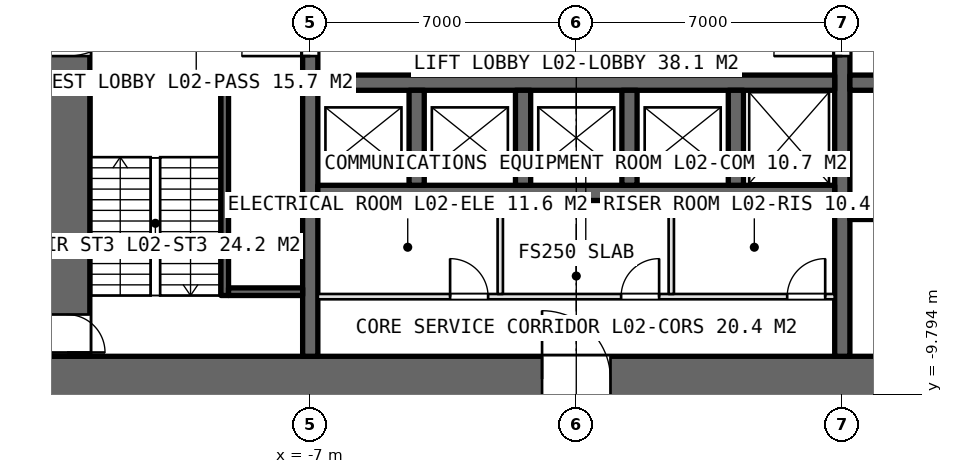
"""IFC4 building model, lengths in metres.
Left out: names, types, materials, properties, quantities, classifications, styles, units other than length and angle.
Written with IfcOpenShell. Run it as: python <this file> out.ifc"""

import sys

from ifc_helpers import new_model, si_unit, direction, frame, frame_2d, origin, place, context, subcontext, project, spatial, rectangle, extrude, element, fill, save


model = new_model("IFC4")
c1 = context("Model", 3, precision=1e-05, world=origin(), true_north=direction((0.0, 1.0)))
c2 = subcontext(c1, "Body", "Model", "MODEL_VIEW")
j1 = project(units=[si_unit("LENGTHUNIT", "METRE"), si_unit("PLANEANGLEUNIT", "RADIAN")], contexts=[c1])
p1 = place(None, origin())
s1 = spatial("IfcSite", under=j1, at=p1, CompositionType="ELEMENT")
p2 = place(p1, origin())
s2 = spatial("IfcBuilding", under=s1, at=p2, CompositionType="ELEMENT")
p3 = place(p2, frame((0.0, 0.0, 10.0)))
s3 = spatial("IfcBuildingStorey", under=s2, at=p3, CompositionType="ELEMENT", Elevation=10.0)
p4 = place(p3, frame((-14.0, -9.4, 0.0), z_axis=(0.0, 0.0, 1.0), x_axis=(1.0, 0.0, 0.0)))
e1 = element("IfcWall", 1, at=p4, inside=s3, PredefinedType="SHEAR", context=c2, shape_type="SweptSolid", body=[
    extrude(rectangle(XDim=28.0, YDim=1.2, at=frame_2d((14.0, 0.0))), origin(), (0.0, 0.0, 1.0), 5.0),
])
p5 = place(p4, frame((13.1, 0.0, 0.0)))
e2 = element("IfcOpeningElement", 2, at=p5, cuts=e1, PredefinedType="OPENING", context=c2, shape_type="SweptSolid", body=[
    extrude(rectangle(XDim=1.8, YDim=2.4, at=frame_2d((0.9, 1.2))), frame((0.0, 0.61, 0.0), z_axis=(0.0, -1.0, 0.0), x_axis=(1.0, 0.0, 0.0)), (0.0, 0.0, 1.0), 1.22),
])
p6 = place(p4, frame((22.9, 0.0, 0.0)))
e3 = element("IfcOpeningElement", 3, at=p6, cuts=e1, PredefinedType="OPENING", context=c2, shape_type="SweptSolid", body=[
    extrude(rectangle(XDim=2.2, YDim=2.7, at=frame_2d((1.1, 1.35))), frame((0.0, 0.61, 0.0), z_axis=(0.0, -1.0, 0.0), x_axis=(1.0, 0.0, 0.0)), (0.0, 0.0, 1.0), 1.22),
])
p7 = place(p3, frame((-13.4, 8.8, 0.0), z_axis=(0.0, 0.0, 1.0), x_axis=(0.0, -1.0, 0.0)))
e4 = element("IfcWall", 4, at=p7, inside=s3, PredefinedType="SHEAR", context=c2, shape_type="SweptSolid", body=[
    extrude(rectangle(XDim=17.6, YDim=1.2, at=frame_2d((8.8, 0.0))), origin(), (0.0, 0.0, 1.0), 5.0),
])
p8 = place(p7, frame((7.9, 0.0, 0.0)))
e5 = element("IfcOpeningElement", 5, at=p8, cuts=e4, PredefinedType="OPENING", context=c2, shape_type="SweptSolid", body=[
    extrude(rectangle(XDim=1.8, YDim=2.4, at=frame_2d((0.9, 1.2))), frame((0.0, 0.61, 0.0), z_axis=(0.0, -1.0, 0.0), x_axis=(1.0, 0.0, 0.0)), (0.0, 0.0, 1.0), 1.22),
])
p9 = place(p7, frame((16.5, 0.0, 0.0)))
e6 = element("IfcOpeningElement", 6, at=p9, cuts=e4, PredefinedType="OPENING", context=c2, shape_type="SweptSolid", body=[
    extrude(rectangle(XDim=1.0, YDim=2.4, at=frame_2d((0.5, 1.2))), frame((0.0, 0.61, 0.0), z_axis=(0.0, -1.0, 0.0), x_axis=(1.0, 0.0, 0.0)), (0.0, 0.0, 1.0), 1.22),
])
p10 = place(p3, frame((-7.0, -8.8, 0.0), z_axis=(0.0, 0.0, 1.0), x_axis=(0.0, 1.0, 0.0)))
e7 = element("IfcWall", 7, at=p10, inside=s3, PredefinedType="SHEAR", context=c2, shape_type="SweptSolid", body=[
    extrude(rectangle(XDim=17.6, YDim=0.4, at=frame_2d((8.8, 0.0))), origin(), (0.0, 0.0, 1.0), 5.0),
])
p11 = place(p10, frame((7.9, 0.0, 0.0)))
e8 = element("IfcOpeningElement", 8, at=p11, cuts=e7, PredefinedType="OPENING", context=c2, shape_type="SweptSolid", body=[
    extrude(rectangle(XDim=1.8, YDim=2.4, at=frame_2d((0.9, 1.2))), frame((0.0, 0.21, 0.0), z_axis=(0.0, -1.0, 0.0), x_axis=(1.0, 0.0, 0.0)), (0.0, 0.0, 1.0), 0.42),
])
p12 = place(p3, frame((7.0, -8.8, 0.0), z_axis=(0.0, 0.0, 1.0), x_axis=(0.0, 1.0, 0.0)))
e9 = element("IfcWall", 9, at=p12, inside=s3, PredefinedType="SHEAR", context=c2, shape_type="SweptSolid", body=[
    extrude(rectangle(XDim=17.6, YDim=0.4, at=frame_2d((8.8, 0.0))), origin(), (0.0, 0.0, 1.0), 5.0),
])
p13 = place(p12, frame((7.9, 0.0, 0.0)))
e10 = element("IfcOpeningElement", 10, at=p13, cuts=e9, PredefinedType="OPENING", context=c2, shape_type="SweptSolid", body=[
    extrude(rectangle(XDim=1.8, YDim=2.4, at=frame_2d((0.9, 1.2))), frame((0.0, 0.21, 0.0), z_axis=(0.0, -1.0, 0.0), x_axis=(1.0, 0.0, 0.0)), (0.0, 0.0, 1.0), 0.42),
])
for number, where, z_axis, x_axis in (
    (11, (-6.8, -1.6, 0.0), (0.0, 0.0, 1.0), (1.0, 0.0, 0.0)),
    (12, (-6.8, -4.5, 0.0), (0.0, 0.0, 1.0), (1.0, 0.0, 0.0)),
):
    element("IfcWall", number, at=place(p3, frame(where, z_axis=z_axis, x_axis=x_axis)), inside=s3, PredefinedType="SHEAR", context=c2, shape_type="SweptSolid", body=[
        extrude(rectangle(XDim=13.6, YDim=0.4, at=frame_2d((6.8, 0.0))), origin(), (0.0, 0.0, 1.0), 5.0),
    ])
p14 = place(p3, frame((-12.8, -1.6, 0.0), z_axis=(0.0, 0.0, 1.0), x_axis=(1.0, 0.0, 0.0)))
e13 = element("IfcWall", 13, at=p14, inside=s3, PredefinedType="SHEAR", context=c2, shape_type="SweptSolid", body=[
    extrude(rectangle(XDim=5.6, YDim=0.4, at=frame_2d((2.8, 0.0))), origin(), (0.0, 0.0, 1.0), 5.0),
])
p15 = place(p3, frame((7.2, -1.6, 0.0), z_axis=(0.0, 0.0, 1.0), x_axis=(1.0, 0.0, 0.0)))
e14 = element("IfcWall", 14, at=p15, inside=s3, PredefinedType="SHEAR", context=c2, shape_type="SweptSolid", body=[
    extrude(rectangle(XDim=5.6, YDim=0.4, at=frame_2d((2.8, 0.0))), origin(), (0.0, 0.0, 1.0), 5.0),
])
p16 = place(p15, frame((0.9, 0.0, 0.0)))
e15 = element("IfcOpeningElement", 15, at=p16, cuts=e14, PredefinedType="OPENING", context=c2, shape_type="SweptSolid", body=[
    extrude(rectangle(XDim=1.3, YDim=2.4, at=frame_2d((0.65, 1.2))), frame((0.0, 0.21, 0.0), z_axis=(0.0, -1.0, 0.0), x_axis=(1.0, 0.0, 0.0)), (0.0, 0.0, 1.0), 0.42),
])
p17 = place(p15, frame((3.9, 0.0, 0.0)))
e16 = element("IfcOpeningElement", 16, at=p17, cuts=e14, PredefinedType="OPENING", context=c2, shape_type="SweptSolid", body=[
    extrude(rectangle(XDim=1.3, YDim=2.4, at=frame_2d((0.65, 1.2))), frame((0.0, 0.21, 0.0), z_axis=(0.0, -1.0, 0.0), x_axis=(1.0, 0.0, 0.0)), (0.0, 0.0, 1.0), 0.42),
])
p18 = place(p3, frame((7.2, -5.0, 0.0), z_axis=(0.0, 0.0, 1.0), x_axis=(1.0, 0.0, 0.0)))
e17 = element("IfcWall", 17, at=p18, inside=s3, PredefinedType="SHEAR", context=c2, shape_type="SweptSolid", body=[
    extrude(rectangle(XDim=5.6, YDim=0.4, at=frame_2d((2.8, 0.0))), origin(), (0.0, 0.0, 1.0), 5.0),
])
for number, where, z_axis, x_axis in (
    (18, (-4.2, -4.3, 0.0), (0.0, 0.0, 1.0), (0.0, 1.0, 0.0)),
    (19, (-1.4, -4.3, 0.0), (0.0, 0.0, 1.0), (0.0, 1.0, 0.0)),
    (20, (1.4, -4.3, 0.0), (0.0, 0.0, 1.0), (0.0, 1.0, 0.0)),
    (21, (4.2, -4.3, 0.0), (0.0, 0.0, 1.0), (0.0, 1.0, 0.0)),
):
    element("IfcWall", number, at=place(p3, frame(where, z_axis=z_axis, x_axis=x_axis)), inside=s3, PredefinedType="SHEAR", context=c2, shape_type="SweptSolid", body=[
        extrude(rectangle(XDim=2.5, YDim=0.4, at=frame_2d((1.25, 0.0))), origin(), (0.0, 0.0, 1.0), 5.0),
    ])
p19 = place(p3, frame((-6.8, -7.23, 0.0), z_axis=(0.0, 0.0, 1.0), x_axis=(1.0, 0.0, 0.0)))
e22 = element("IfcWall", 22, at=p19, inside=s3, PredefinedType="PARTITIONING", context=c2, shape_type="SweptSolid", body=[
    extrude(rectangle(XDim=13.6, YDim=0.14, at=frame_2d((6.8, 0.0))), origin(), (0.0, 0.0, 1.0), 4.75),
])
p20 = place(p19, frame((3.48, 0.0, 0.0)))
e23 = element("IfcOpeningElement", 23, at=p20, cuts=e22, PredefinedType="OPENING", context=c2, shape_type="SweptSolid", body=[
    extrude(rectangle(XDim=1.0, YDim=2.4, at=frame_2d((0.5, 1.2))), frame((0.0, 0.08, 0.0), z_axis=(0.0, -1.0, 0.0), x_axis=(1.0, 0.0, 0.0)), (0.0, 0.0, 1.0), 0.16),
])
p21 = place(p19, frame((7.98, 0.0, 0.0)))
e24 = element("IfcOpeningElement", 24, at=p21, cuts=e22, PredefinedType="OPENING", context=c2, shape_type="SweptSolid", body=[
    extrude(rectangle(XDim=1.0, YDim=2.4, at=frame_2d((0.5, 1.2))), frame((0.0, 0.08, 0.0), z_axis=(0.0, -1.0, 0.0), x_axis=(1.0, 0.0, 0.0)), (0.0, 0.0, 1.0), 0.16),
])
p22 = place(p19, frame((12.35, 0.0, 0.0)))
e25 = element("IfcOpeningElement", 25, at=p22, cuts=e22, PredefinedType="OPENING", context=c2, shape_type="SweptSolid", body=[
    extrude(rectangle(XDim=1.0, YDim=2.4, at=frame_2d((0.5, 1.2))), frame((0.0, 0.08, 0.0), z_axis=(0.0, -1.0, 0.0), x_axis=(1.0, 0.0, 0.0)), (0.0, 0.0, 1.0), 0.16),
])
for number, where, z_axis, x_axis in (
    (26, (-2.0, -4.7, 0.0), (0.0, 0.0, 1.0), (0.0, -1.0, 0.0)),
    (27, (2.5, -4.7, 0.0), (0.0, 0.0, 1.0), (0.0, -1.0, 0.0)),
):
    element("IfcWall", number, at=place(p3, frame(where, z_axis=z_axis, x_axis=x_axis)), inside=s3, PredefinedType="PARTITIONING", context=c2, shape_type="SweptSolid", body=[
        extrude(rectangle(XDim=2.46, YDim=0.14, at=frame_2d((1.23, 0.0))), origin(), (0.0, 0.0, 1.0), 4.75),
    ])
p23 = place(p3, frame((-9.25, -7.2, 0.0), z_axis=(0.0, 0.0, 1.0), x_axis=(0.0, 1.0, 0.0)))
e28 = element("IfcWall", 28, at=p23, inside=s3, PredefinedType="SOLIDWALL", context=c2, shape_type="SweptSolid", body=[
    extrude(rectangle(XDim=5.4, YDim=0.2, at=frame_2d((2.7, 0.0))), origin(), (0.0, 0.0, 1.0), 5.0),
])
p24 = place(p3, frame((-9.15, -7.1, 0.0), z_axis=(0.0, 0.0, 1.0), x_axis=(1.0, 0.0, 0.0)))
e29 = element("IfcWall", 29, at=p24, inside=s3, PredefinedType="SOLIDWALL", context=c2, shape_type="SweptSolid", body=[
    extrude(rectangle(XDim=1.95, YDim=0.2, at=frame_2d((0.975, 0.0))), origin(), (0.0, 0.0, 1.0), 5.0),
])
p25 = place(p8, origin())
e30 = element("IfcDoor", 30, at=p25, inside=s3, OperationType="DOUBLE_DOOR_SINGLE_SWING", PredefinedType="DOOR", context=c2, shape_type="SweptSolid", body=[
    extrude(rectangle(XDim=1.8, YDim=2.4, at=frame_2d((0.9, 1.2))), frame((0.0, 0.025, 0.0), z_axis=(0.0, -1.0, 0.0), x_axis=(1.0, 0.0, 0.0)), (0.0, 0.0, 1.0), 0.05),
])
fill(e5, e30)
p26 = place(p11, origin())
e31 = element("IfcDoor", 31, at=p26, inside=s3, OperationType="DOUBLE_DOOR_SINGLE_SWING", PredefinedType="DOOR", context=c2, shape_type="SweptSolid", body=[
    extrude(rectangle(XDim=1.8, YDim=2.4, at=frame_2d((0.9, 1.2))), frame((0.0, 0.025, 0.0), z_axis=(0.0, -1.0, 0.0), x_axis=(1.0, 0.0, 0.0)), (0.0, 0.0, 1.0), 0.05),
])
fill(e8, e31)
p27 = place(p13, origin())
e32 = element("IfcDoor", 32, at=p27, inside=s3, OperationType="DOUBLE_DOOR_SINGLE_SWING", PredefinedType="DOOR", context=c2, shape_type="SweptSolid", body=[
    extrude(rectangle(XDim=1.8, YDim=2.4, at=frame_2d((0.9, 1.2))), frame((0.0, 0.025, 0.0), z_axis=(0.0, -1.0, 0.0), x_axis=(1.0, 0.0, 0.0)), (0.0, 0.0, 1.0), 0.05),
])
fill(e10, e32)
p28 = place(p9, origin())
e33 = element("IfcDoor", 33, at=p28, inside=s3, OperationType="SINGLE_SWING_RIGHT", PredefinedType="DOOR", context=c2, shape_type="SweptSolid", body=[
    extrude(rectangle(XDim=1.0, YDim=2.4, at=frame_2d((0.5, 1.2))), frame((0.0, 0.025, 0.0), z_axis=(0.0, -1.0, 0.0), x_axis=(1.0, 0.0, 0.0)), (0.0, 0.0, 1.0), 0.05),
])
fill(e6, e33)
p29 = place(p20, origin())
e34 = element("IfcDoor", 34, at=p29, inside=s3, OperationType="SINGLE_SWING_LEFT", PredefinedType="DOOR", context=c2, shape_type="SweptSolid", body=[
    extrude(rectangle(XDim=1.0, YDim=2.4, at=frame_2d((0.5, 1.2))), frame((0.0, 0.025, 0.0), z_axis=(0.0, -1.0, 0.0), x_axis=(1.0, 0.0, 0.0)), (0.0, 0.0, 1.0), 0.05),
])
fill(e23, e34)
p30 = place(p21, origin())
e35 = element("IfcDoor", 35, at=p30, inside=s3, OperationType="SINGLE_SWING_RIGHT", PredefinedType="DOOR", context=c2, shape_type="SweptSolid", body=[
    extrude(rectangle(XDim=1.0, YDim=2.4, at=frame_2d((0.5, 1.2))), frame((0.0, 0.025, 0.0), z_axis=(0.0, -1.0, 0.0), x_axis=(1.0, 0.0, 0.0)), (0.0, 0.0, 1.0), 0.05),
])
fill(e24, e35)
p31 = place(p22, origin())
e36 = element("IfcDoor", 36, at=p31, inside=s3, OperationType="SINGLE_SWING_RIGHT", PredefinedType="DOOR", context=c2, shape_type="SweptSolid", body=[
    extrude(rectangle(XDim=1.0, YDim=2.4, at=frame_2d((0.5, 1.2))), frame((0.0, 0.025, 0.0), z_axis=(0.0, -1.0, 0.0), x_axis=(1.0, 0.0, 0.0)), (0.0, 0.0, 1.0), 0.05),
])
fill(e25, e36)
p32 = place(p5, origin())
e37 = element("IfcDoor", 37, at=p32, inside=s3, OperationType="DOUBLE_DOOR_SINGLE_SWING", PredefinedType="DOOR", context=c2, shape_type="SweptSolid", body=[
    extrude(rectangle(XDim=1.8, YDim=2.4, at=frame_2d((0.9, 1.2))), frame((0.0, 0.025, 0.0), z_axis=(0.0, -1.0, 0.0), x_axis=(1.0, 0.0, 0.0)), (0.0, 0.0, 1.0), 0.05),
])
fill(e2, e37)
save(model, sys.argv[1])
